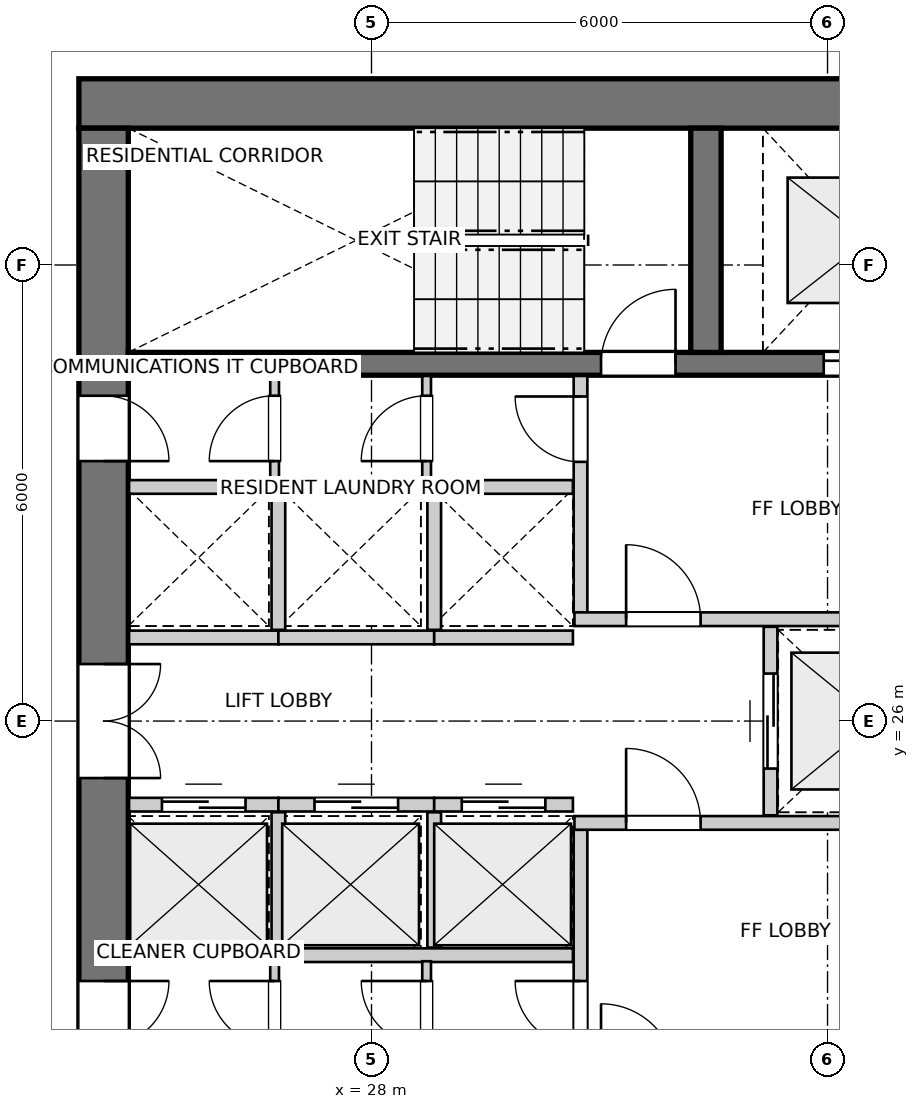
"""IFC4 building model, lengths in metres.
Left out: names, types, materials, properties, quantities, classifications, styles, units other than length and angle.
Written with IfcOpenShell. Run it as: python <this file> out.ifc"""

import sys

from ifc_helpers import new_model, si_unit, direction, frame, frame_2d, origin, place, context, subcontext, project, spatial, rectangle, extrude, source, transform, mapped, element, fill, save


model = new_model("IFC4")
c1 = context("Model", 3, precision=1e-05, world=origin(), true_north=direction((0.0, 1.0)))
c2 = subcontext(c1, "Body", "Model", "MODEL_VIEW")
j1 = project(units=[si_unit("LENGTHUNIT", "METRE"), si_unit("PLANEANGLEUNIT", "RADIAN")], contexts=[c1])
p1 = place(None, origin())
s1 = spatial("IfcSite", under=j1, at=p1, CompositionType="ELEMENT")
p2 = place(p1, origin())
s2 = spatial("IfcBuilding", under=s1, at=p2, CompositionType="ELEMENT")
p3 = place(p2, frame((0.0, 0.0, 118.4)))
s3 = spatial("IfcBuildingStorey", under=s2, at=p3, CompositionType="ELEMENT", Elevation=118.4)
p4 = place(p3, frame((36.55, 34.125, 0.0), z_axis=(0.0, 0.0, 1.0), x_axis=(-1.0, 0.0, 0.0)))
e1 = element("IfcWall", 1, at=p4, inside=s3, PredefinedType="SHEAR", context=c2, shape_type="SweptSolid", body=[
    extrude(rectangle(XDim=12.4, YDim=0.65, at=frame_2d((6.2, 0.0))), origin(), (0.0, 0.0, 1.0), 2.95),
])
p5 = place(p3, frame((24.475, 33.8, 0.0), z_axis=(0.0, 0.0, 1.0), x_axis=(0.0, -1.0, 0.0)))
e2 = element("IfcWall", 2, at=p5, inside=s3, PredefinedType="SHEAR", context=c2, shape_type="SweptSolid", body=[
    extrude(rectangle(XDim=15.6, YDim=0.65, at=frame_2d((7.8, 0.0))), origin(), (0.0, 0.0, 1.0), 2.95),
])
p6 = place(p5, frame((7.05, 0.0, 0.0)))
e3 = element("IfcOpeningElement", 3, at=p6, cuts=e2, PredefinedType="OPENING", context=c2, shape_type="SweptSolid", body=[
    extrude(rectangle(XDim=1.5, YDim=2.15, at=frame_2d((0.75, 1.075))), frame((0.0, 0.335, 0.0), z_axis=(0.0, -1.0, 0.0), x_axis=(1.0, 0.0, 0.0)), (0.0, 0.0, 1.0), 0.67),
])
p7 = place(p5, frame((3.52, 0.0, 0.0)))
e4 = element("IfcOpeningElement", 4, at=p7, cuts=e2, PredefinedType="OPENING", context=c2, shape_type="SweptSolid", body=[
    extrude(rectangle(XDim=0.86, YDim=2.05, at=frame_2d((0.43, 1.025))), frame((0.0, 0.335, 0.0), z_axis=(0.0, -1.0, 0.0), x_axis=(1.0, 0.0, 0.0)), (0.0, 0.0, 1.0), 0.67),
])
p8 = place(p5, frame((11.22, 0.0, 0.0)))
e5 = element("IfcOpeningElement", 5, at=p8, cuts=e2, PredefinedType="OPENING", context=c2, shape_type="SweptSolid", body=[
    extrude(rectangle(XDim=0.86, YDim=2.05, at=frame_2d((0.43, 1.025))), frame((0.0, 0.335, 0.0), z_axis=(0.0, -1.0, 0.0), x_axis=(1.0, 0.0, 0.0)), (0.0, 0.0, 1.0), 0.67),
])
p9 = place(p3, frame((24.8, 30.7, 0.0), z_axis=(0.0, 0.0, 1.0), x_axis=(1.0, 0.0, 0.0)))
e6 = element("IfcWall", 6, at=p9, inside=s3, PredefinedType="SHEAR", context=c2, shape_type="SweptSolid", body=[
    extrude(rectangle(XDim=11.1, YDim=0.3, at=frame_2d((5.55, 0.0))), origin(), (0.0, 0.0, 1.0), 2.95),
])
p10 = place(p9, frame((6.22, 0.0, 0.0)))
e7 = element("IfcOpeningElement", 7, at=p10, cuts=e6, PredefinedType="OPENING", context=c2, shape_type="SweptSolid", body=[
    extrude(rectangle(XDim=0.98, YDim=2.15, at=frame_2d((0.49, 1.075))), frame((0.0, 0.16, 0.0), z_axis=(0.0, -1.0, 0.0), x_axis=(1.0, 0.0, 0.0)), (0.0, 0.0, 1.0), 0.32),
])
p11 = place(p9, frame((9.15, 0.0, 0.0)))
e8 = element("IfcOpeningElement", 8, at=p11, cuts=e6, PredefinedType="OPENING", context=c2, shape_type="SweptSolid", body=[
    extrude(rectangle(XDim=1.15, YDim=2.15, at=frame_2d((0.575, 1.075))), frame((0.0, 0.16, 0.0), z_axis=(0.0, -1.0, 0.0), x_axis=(1.0, 0.0, 0.0)), (0.0, 0.0, 1.0), 0.32),
])
p12 = place(p3, frame((32.4, 30.85, 0.0), z_axis=(0.0, 0.0, 1.0), x_axis=(0.0, 1.0, 0.0)))
e9 = element("IfcWall", 9, at=p12, inside=s3, PredefinedType="SHEAR", context=c2, shape_type="SweptSolid", body=[
    extrude(rectangle(XDim=2.95, YDim=0.4, at=frame_2d((1.475, 0.0))), origin(), (0.0, 0.0, 1.0), 2.95),
])
p13 = place(p3, frame((30.75, 21.46, 0.0), z_axis=(0.0, 0.0, 1.0), x_axis=(0.0, 1.0, 0.0)))
e10 = element("IfcWall", 10, at=p13, inside=s3, PredefinedType="PARTITIONING", context=c2, shape_type="SweptSolid", body=[
    extrude(rectangle(XDim=3.11, YDim=0.18, at=frame_2d((1.555, 0.0))), origin(), (0.0, 0.0, 1.0), 2.95),
])
p14 = place(p13, frame((0.26, 0.0, 0.0)))
e11 = element("IfcOpeningElement", 11, at=p14, cuts=e10, PredefinedType="OPENING", context=c2, shape_type="SweptSolid", body=[
    extrude(rectangle(XDim=0.86, YDim=2.05, at=frame_2d((0.43, 1.025))), frame((0.0, 0.1, 0.0), z_axis=(0.0, -1.0, 0.0), x_axis=(1.0, 0.0, 0.0)), (0.0, 0.0, 1.0), 0.2),
])
p15 = place(p3, frame((30.67, 24.66, 0.0), z_axis=(0.0, 0.0, 1.0), x_axis=(1.0, 0.0, 0.0)))
e12 = element("IfcWall", 12, at=p15, inside=s3, PredefinedType="PARTITIONING", context=c2, shape_type="SweptSolid", body=[
    extrude(rectangle(XDim=5.22, YDim=0.18, at=frame_2d((2.61, 0.0))), origin(), (0.0, 0.0, 1.0), 2.95),
])
p16 = place(p15, frame((0.68, 0.0, 0.0)))
e13 = element("IfcOpeningElement", 13, at=p16, cuts=e12, PredefinedType="OPENING", context=c2, shape_type="SweptSolid", body=[
    extrude(rectangle(XDim=0.98, YDim=2.15, at=frame_2d((0.49, 1.075))), frame((0.0, 0.1, 0.0), z_axis=(0.0, -1.0, 0.0), x_axis=(1.0, 0.0, 0.0)), (0.0, 0.0, 1.0), 0.2),
])
p17 = place(p3, frame((30.75, 27.43, 0.0), z_axis=(0.0, 0.0, 1.0), x_axis=(0.0, 1.0, 0.0)))
e14 = element("IfcWall", 14, at=p17, inside=s3, PredefinedType="PARTITIONING", context=c2, shape_type="SweptSolid", body=[
    extrude(rectangle(XDim=3.11, YDim=0.18, at=frame_2d((1.555, 0.0))), origin(), (0.0, 0.0, 1.0), 2.95),
])
p18 = place(p17, frame((1.98, 0.0, 0.0)))
e15 = element("IfcOpeningElement", 15, at=p18, cuts=e14, PredefinedType="OPENING", context=c2, shape_type="SweptSolid", body=[
    extrude(rectangle(XDim=0.86, YDim=2.05, at=frame_2d((0.43, 1.025))), frame((0.0, 0.1, 0.0), z_axis=(0.0, -1.0, 0.0), x_axis=(1.0, 0.0, 0.0)), (0.0, 0.0, 1.0), 0.2),
])
p19 = place(p3, frame((30.67, 27.34, 0.0), z_axis=(0.0, 0.0, 1.0), x_axis=(1.0, 0.0, 0.0)))
e16 = element("IfcWall", 16, at=p19, inside=s3, PredefinedType="PARTITIONING", context=c2, shape_type="SweptSolid", body=[
    extrude(rectangle(XDim=5.22, YDim=0.18, at=frame_2d((2.61, 0.0))), origin(), (0.0, 0.0, 1.0), 2.95),
])
p20 = place(p19, frame((0.68, 0.0, 0.0)))
e17 = element("IfcOpeningElement", 17, at=p20, cuts=e16, PredefinedType="OPENING", context=c2, shape_type="SweptSolid", body=[
    extrude(rectangle(XDim=0.98, YDim=2.15, at=frame_2d((0.49, 1.075))), frame((0.0, 0.1, 0.0), z_axis=(0.0, -1.0, 0.0), x_axis=(1.0, 0.0, 0.0)), (0.0, 0.0, 1.0), 0.2),
])
p21 = place(p3, frame((33.25, 24.76, 0.0), z_axis=(0.0, 0.0, 1.0), x_axis=(0.0, 1.0, 0.0)))
e18 = element("IfcWall", 18, at=p21, inside=s3, PredefinedType="PARTITIONING", context=c2, shape_type="SweptSolid", body=[
    extrude(rectangle(XDim=2.48, YDim=0.18, at=frame_2d((1.24, 0.0))), origin(), (0.0, 0.0, 1.0), 2.95),
])
p22 = place(p21, frame((0.615, 0.0, 0.0)))
e19 = element("IfcOpeningElement", 19, at=p22, cuts=e18, PredefinedType="OPENING", context=c2, shape_type="SweptSolid", body=[
    extrude(rectangle(XDim=1.25, YDim=2.15, at=frame_2d((0.625, 1.075))), frame((0.0, 0.1, 0.0), z_axis=(0.0, -1.0, 0.0), x_axis=(1.0, 0.0, 0.0)), (0.0, 0.0, 1.0), 0.2),
])
p23 = place(p3, frame((24.81, 22.92, 0.0), z_axis=(0.0, 0.0, 1.0), x_axis=(1.0, 0.0, 0.0)))
e20 = element("IfcWall", 20, at=p23, inside=s3, PredefinedType="PARTITIONING", context=c2, shape_type="SweptSolid", body=[
    extrude(rectangle(XDim=5.84, YDim=0.18, at=frame_2d((2.92, 0.0))), origin(), (0.0, 0.0, 1.0), 2.95),
])
p24 = place(p3, frame((24.81, 24.9, 0.0), z_axis=(0.0, 0.0, 1.0), x_axis=(1.0, 0.0, 0.0)))
e21 = element("IfcWall", 21, at=p24, inside=s3, PredefinedType="PARTITIONING", context=c2, shape_type="SweptSolid", body=[
    extrude(rectangle(XDim=1.965, YDim=0.18, at=frame_2d((0.982, 0.0))), origin(), (0.0, 0.0, 1.0), 2.95),
])
p25 = place(p24, frame((0.433, 0.0, 0.0)))
e22 = element("IfcOpeningElement", 22, at=p25, cuts=e21, PredefinedType="OPENING", context=c2, shape_type="SweptSolid", body=[
    extrude(rectangle(XDim=1.1, YDim=2.15, at=frame_2d((0.55, 1.075))), frame((0.0, 0.1, 0.0), z_axis=(0.0, -1.0, 0.0), x_axis=(1.0, 0.0, 0.0)), (0.0, 0.0, 1.0), 0.2),
])
p26 = place(p3, frame((26.775, 24.9, 0.0), z_axis=(0.0, 0.0, 1.0), x_axis=(1.0, 0.0, 0.0)))
e23 = element("IfcWall", 23, at=p26, inside=s3, PredefinedType="PARTITIONING", context=c2, shape_type="SweptSolid", body=[
    extrude(rectangle(XDim=2.05, YDim=0.18, at=frame_2d((1.025, 0.0))), origin(), (0.0, 0.0, 1.0), 2.95),
])
p27 = place(p26, frame((0.475, 0.0, 0.0)))
e24 = element("IfcOpeningElement", 24, at=p27, cuts=e23, PredefinedType="OPENING", context=c2, shape_type="SweptSolid", body=[
    extrude(rectangle(XDim=1.1, YDim=2.15, at=frame_2d((0.55, 1.075))), frame((0.0, 0.1, 0.0), z_axis=(0.0, -1.0, 0.0), x_axis=(1.0, 0.0, 0.0)), (0.0, 0.0, 1.0), 0.2),
])
p28 = place(p3, frame((26.775, 23.02, 0.0), z_axis=(0.0, 0.0, 1.0), x_axis=(0.0, 1.0, 0.0)))
e25 = element("IfcWall", 25, at=p28, inside=s3, PredefinedType="PARTITIONING", context=c2, shape_type="SweptSolid", body=[
    extrude(rectangle(XDim=1.78, YDim=0.18, at=frame_2d((0.89, 0.0))), origin(), (0.0, 0.0, 1.0), 2.95),
])
p29 = place(p3, frame((28.825, 24.9, 0.0), z_axis=(0.0, 0.0, 1.0), x_axis=(1.0, 0.0, 0.0)))
e26 = element("IfcWall", 26, at=p29, inside=s3, PredefinedType="PARTITIONING", context=c2, shape_type="SweptSolid", body=[
    extrude(rectangle(XDim=1.825, YDim=0.18, at=frame_2d((0.913, 0.0))), origin(), (0.0, 0.0, 1.0), 2.95),
])
p30 = place(p29, frame((0.363, 0.0, 0.0)))
e27 = element("IfcOpeningElement", 27, at=p30, cuts=e26, PredefinedType="OPENING", context=c2, shape_type="SweptSolid", body=[
    extrude(rectangle(XDim=1.1, YDim=2.15, at=frame_2d((0.55, 1.075))), frame((0.0, 0.1, 0.0), z_axis=(0.0, -1.0, 0.0), x_axis=(1.0, 0.0, 0.0)), (0.0, 0.0, 1.0), 0.2),
])
p31 = place(p3, frame((28.825, 23.02, 0.0), z_axis=(0.0, 0.0, 1.0), x_axis=(0.0, 1.0, 0.0)))
e28 = element("IfcWall", 28, at=p31, inside=s3, PredefinedType="PARTITIONING", context=c2, shape_type="SweptSolid", body=[
    extrude(rectangle(XDim=1.78, YDim=0.18, at=frame_2d((0.89, 0.0))), origin(), (0.0, 0.0, 1.0), 2.95),
])
p32 = place(p3, frame((24.81, 29.08, 0.0), z_axis=(0.0, 0.0, 1.0), x_axis=(1.0, 0.0, 0.0)))
e29 = element("IfcWall", 29, at=p32, inside=s3, PredefinedType="PARTITIONING", context=c2, shape_type="SweptSolid", body=[
    extrude(rectangle(XDim=5.84, YDim=0.18, at=frame_2d((2.92, 0.0))), origin(), (0.0, 0.0, 1.0), 2.95),
])
p33 = place(p3, frame((24.81, 27.1, 0.0), z_axis=(0.0, 0.0, 1.0), x_axis=(1.0, 0.0, 0.0)))
e30 = element("IfcWall", 30, at=p33, inside=s3, PredefinedType="PARTITIONING", context=c2, shape_type="SweptSolid", body=[
    extrude(rectangle(XDim=1.965, YDim=0.18, at=frame_2d((0.982, 0.0))), origin(), (0.0, 0.0, 1.0), 2.95),
])
p34 = place(p3, frame((26.775, 27.1, 0.0), z_axis=(0.0, 0.0, 1.0), x_axis=(1.0, 0.0, 0.0)))
e31 = element("IfcWall", 31, at=p34, inside=s3, PredefinedType="PARTITIONING", context=c2, shape_type="SweptSolid", body=[
    extrude(rectangle(XDim=2.05, YDim=0.18, at=frame_2d((1.025, 0.0))), origin(), (0.0, 0.0, 1.0), 2.95),
])
p35 = place(p3, frame((26.775, 27.2, 0.0), z_axis=(0.0, 0.0, 1.0), x_axis=(0.0, 1.0, 0.0)))
e32 = element("IfcWall", 32, at=p35, inside=s3, PredefinedType="PARTITIONING", context=c2, shape_type="SweptSolid", body=[
    extrude(rectangle(XDim=1.78, YDim=0.18, at=frame_2d((0.89, 0.0))), origin(), (0.0, 0.0, 1.0), 2.95),
])
p36 = place(p3, frame((28.825, 27.1, 0.0), z_axis=(0.0, 0.0, 1.0), x_axis=(1.0, 0.0, 0.0)))
e33 = element("IfcWall", 33, at=p36, inside=s3, PredefinedType="PARTITIONING", context=c2, shape_type="SweptSolid", body=[
    extrude(rectangle(XDim=1.825, YDim=0.18, at=frame_2d((0.913, 0.0))), origin(), (0.0, 0.0, 1.0), 2.95),
])
p37 = place(p3, frame((28.825, 27.2, 0.0), z_axis=(0.0, 0.0, 1.0), x_axis=(0.0, 1.0, 0.0)))
e34 = element("IfcWall", 34, at=p37, inside=s3, PredefinedType="PARTITIONING", context=c2, shape_type="SweptSolid", body=[
    extrude(rectangle(XDim=1.78, YDim=0.18, at=frame_2d((0.89, 0.0))), origin(), (0.0, 0.0, 1.0), 2.95),
])
p38 = place(p3, frame((26.725, 21.46, 0.0), z_axis=(0.0, 0.0, 1.0), x_axis=(0.0, 1.0, 0.0)))
e35 = element("IfcWall", 35, at=p38, inside=s3, PredefinedType="PARTITIONING", context=c2, shape_type="SweptSolid", body=[
    extrude(rectangle(XDim=1.38, YDim=0.115, at=frame_2d((0.69, 0.0))), origin(), (0.0, 0.0, 1.0), 2.95),
])
p39 = place(p38, frame((0.26, 0.0, 0.0)))
e36 = element("IfcOpeningElement", 36, at=p39, cuts=e35, PredefinedType="OPENING", context=c2, shape_type="SweptSolid", body=[
    extrude(rectangle(XDim=0.86, YDim=2.05, at=frame_2d((0.43, 1.025))), frame((0.0, 0.067, 0.0), z_axis=(0.0, -1.0, 0.0), x_axis=(1.0, 0.0, 0.0)), (0.0, 0.0, 1.0), 0.135),
])
p40 = place(p3, frame((26.725, 29.16, 0.0), z_axis=(0.0, 0.0, 1.0), x_axis=(0.0, 1.0, 0.0)))
e37 = element("IfcWall", 37, at=p40, inside=s3, PredefinedType="PARTITIONING", context=c2, shape_type="SweptSolid", body=[
    extrude(rectangle(XDim=1.38, YDim=0.115, at=frame_2d((0.69, 0.0))), origin(), (0.0, 0.0, 1.0), 2.95),
])
p41 = place(p40, frame((0.26, 0.0, 0.0)))
e38 = element("IfcOpeningElement", 38, at=p41, cuts=e37, PredefinedType="OPENING", context=c2, shape_type="SweptSolid", body=[
    extrude(rectangle(XDim=0.86, YDim=2.05, at=frame_2d((0.43, 1.025))), frame((0.0, 0.067, 0.0), z_axis=(0.0, -1.0, 0.0), x_axis=(1.0, 0.0, 0.0)), (0.0, 0.0, 1.0), 0.135),
])
p42 = place(p3, frame((28.725, 21.46, 0.0), z_axis=(0.0, 0.0, 1.0), x_axis=(0.0, 1.0, 0.0)))
e39 = element("IfcWall", 39, at=p42, inside=s3, PredefinedType="PARTITIONING", context=c2, shape_type="SweptSolid", body=[
    extrude(rectangle(XDim=1.38, YDim=0.115, at=frame_2d((0.69, 0.0))), origin(), (0.0, 0.0, 1.0), 2.95),
])
p43 = place(p42, frame((0.26, 0.0, 0.0)))
e40 = element("IfcOpeningElement", 40, at=p43, cuts=e39, PredefinedType="OPENING", context=c2, shape_type="SweptSolid", body=[
    extrude(rectangle(XDim=0.86, YDim=2.05, at=frame_2d((0.43, 1.025))), frame((0.0, 0.067, 0.0), z_axis=(0.0, -1.0, 0.0), x_axis=(1.0, 0.0, 0.0)), (0.0, 0.0, 1.0), 0.135),
])
p44 = place(p3, frame((28.725, 29.16, 0.0), z_axis=(0.0, 0.0, 1.0), x_axis=(0.0, 1.0, 0.0)))
e41 = element("IfcWall", 41, at=p44, inside=s3, PredefinedType="PARTITIONING", context=c2, shape_type="SweptSolid", body=[
    extrude(rectangle(XDim=1.38, YDim=0.115, at=frame_2d((0.69, 0.0))), origin(), (0.0, 0.0, 1.0), 2.95),
])
p45 = place(p44, frame((0.26, 0.0, 0.0)))
e42 = element("IfcOpeningElement", 42, at=p45, cuts=e41, PredefinedType="OPENING", context=c2, shape_type="SweptSolid", body=[
    extrude(rectangle(XDim=0.86, YDim=2.05, at=frame_2d((0.43, 1.025))), frame((0.0, 0.067, 0.0), z_axis=(0.0, -1.0, 0.0), x_axis=(1.0, 0.0, 0.0)), (0.0, 0.0, 1.0), 0.135),
])
m1 = source(origin(), c2, "Body", "SweptSolid", [
    extrude(rectangle(XDim=0.98, YDim=2.15, at=frame_2d((0.49, 1.075))), frame((0.0, 0.025, 0.0), z_axis=(0.0, -1.0, 0.0), x_axis=(1.0, 0.0, 0.0)), (0.0, 0.0, 1.0), 0.05),
])
p46 = place(p10, origin())
e43 = element("IfcDoor", 43, at=p46, inside=s3, OperationType="SINGLE_SWING_RIGHT", PredefinedType="DOOR", context=c2, shape_type="MappedRepresentation", body=[
    mapped(m1, transform((0.0, 0.0, 0.0), x_axis=(1.0, 0.0, 0.0), y_axis=(0.0, 1.0, 0.0), z_axis=(0.0, 0.0, 1.0), scale=1.0)),
])
fill(e7, e43)
m2 = source(origin(), c2, "Body", "SweptSolid", [
    extrude(rectangle(XDim=1.15, YDim=2.15, at=frame_2d((0.575, 1.075))), frame((0.0, 0.025, 0.0), z_axis=(0.0, -1.0, 0.0), x_axis=(1.0, 0.0, 0.0)), (0.0, 0.0, 1.0), 0.05),
])
p47 = place(p11, origin())
e44 = element("IfcDoor", 44, at=p47, inside=s3, OperationType="DOUBLE_DOOR_SLIDING", PredefinedType="DOOR", context=c2, shape_type="MappedRepresentation", body=[
    mapped(m2, transform((0.0, 0.0, 0.0), x_axis=(1.0, 0.0, 0.0), y_axis=(0.0, 1.0, 0.0), z_axis=(0.0, 0.0, 1.0), scale=1.0)),
])
fill(e8, e44)
m3 = source(origin(), c2, "Body", "SweptSolid", [
    extrude(rectangle(XDim=1.5, YDim=2.15, at=frame_2d((0.75, 1.075))), frame((0.0, 0.025, 0.0), z_axis=(0.0, -1.0, 0.0), x_axis=(1.0, 0.0, 0.0)), (0.0, 0.0, 1.0), 0.05),
])
p48 = place(p6, origin())
e45 = element("IfcDoor", 45, at=p48, inside=s3, OperationType="DOUBLE_DOOR_SINGLE_SWING", PredefinedType="DOOR", context=c2, shape_type="MappedRepresentation", body=[
    mapped(m3, transform((0.0, 0.0, 0.0), x_axis=(1.0, 0.0, 0.0), y_axis=(0.0, 1.0, 0.0), z_axis=(0.0, 0.0, 1.0), scale=1.0)),
])
fill(e3, e45)
m4 = source(origin(), c2, "Body", "SweptSolid", [
    extrude(rectangle(XDim=0.86, YDim=2.05, at=frame_2d((0.43, 1.025))), frame((0.0, 0.025, 0.0), z_axis=(0.0, -1.0, 0.0), x_axis=(1.0, 0.0, 0.0)), (0.0, 0.0, 1.0), 0.05),
])
p49 = place(p7, origin())
e46 = element("IfcDoor", 46, at=p49, inside=s3, OperationType="SINGLE_SWING_RIGHT", PredefinedType="DOOR", context=c2, shape_type="MappedRepresentation", body=[
    mapped(m4, transform((0.0, 0.0, 0.0), x_axis=(1.0, 0.0, 0.0), y_axis=(0.0, 1.0, 0.0), z_axis=(0.0, 0.0, 1.0), scale=1.0)),
])
fill(e4, e46)
p50 = place(p8, origin())
e47 = element("IfcDoor", 47, at=p50, inside=s3, OperationType="SINGLE_SWING_LEFT", PredefinedType="DOOR", context=c2, shape_type="MappedRepresentation", body=[
    mapped(m4, transform((0.0, 0.0, 0.0), x_axis=(1.0, 0.0, 0.0), y_axis=(0.0, 1.0, 0.0), z_axis=(0.0, 0.0, 1.0), scale=1.0)),
])
fill(e5, e47)
p51 = place(p14, origin())
e48 = element("IfcDoor", 48, at=p51, inside=s3, OperationType="SINGLE_SWING_RIGHT", PredefinedType="DOOR", context=c2, shape_type="MappedRepresentation", body=[
    mapped(m4, transform((0.0, 0.0, 0.0), x_axis=(1.0, 0.0, 0.0), y_axis=(0.0, 1.0, 0.0), z_axis=(0.0, 0.0, 1.0), scale=1.0)),
])
fill(e11, e48)
p52 = place(p16, origin())
e49 = element("IfcDoor", 49, at=p52, inside=s3, OperationType="SINGLE_SWING_LEFT", PredefinedType="DOOR", context=c2, shape_type="MappedRepresentation", body=[
    mapped(m1, transform((0.0, 0.0, 0.0), x_axis=(1.0, 0.0, 0.0), y_axis=(0.0, 1.0, 0.0), z_axis=(0.0, 0.0, 1.0), scale=1.0)),
])
fill(e13, e49)
p53 = place(p18, origin())
e50 = element("IfcDoor", 50, at=p53, inside=s3, OperationType="SINGLE_SWING_RIGHT", PredefinedType="DOOR", context=c2, shape_type="MappedRepresentation", body=[
    mapped(m4, transform((0.0, 0.0, 0.0), x_axis=(1.0, 0.0, 0.0), y_axis=(0.0, 1.0, 0.0), z_axis=(0.0, 0.0, 1.0), scale=1.0)),
])
fill(e15, e50)
p54 = place(p20, origin())
e51 = element("IfcDoor", 51, at=p54, inside=s3, OperationType="SINGLE_SWING_LEFT", PredefinedType="DOOR", context=c2, shape_type="MappedRepresentation", body=[
    mapped(m1, transform((0.0, 0.0, 0.0), x_axis=(1.0, 0.0, 0.0), y_axis=(0.0, 1.0, 0.0), z_axis=(0.0, 0.0, 1.0), scale=1.0)),
])
fill(e17, e51)
m5 = source(origin(), c2, "Body", "SweptSolid", [
    extrude(rectangle(XDim=1.25, YDim=2.15, at=frame_2d((0.625, 1.075))), frame((0.0, 0.025, 0.0), z_axis=(0.0, -1.0, 0.0), x_axis=(1.0, 0.0, 0.0)), (0.0, 0.0, 1.0), 0.05),
])
p55 = place(p22, origin())
e52 = element("IfcDoor", 52, at=p55, inside=s3, OperationType="DOUBLE_DOOR_SLIDING", PredefinedType="DOOR", context=c2, shape_type="MappedRepresentation", body=[
    mapped(m5, transform((0.0, 0.0, 0.0), x_axis=(1.0, 0.0, 0.0), y_axis=(0.0, 1.0, 0.0), z_axis=(0.0, 0.0, 1.0), scale=1.0)),
])
fill(e19, e52)
m6 = source(origin(), c2, "Body", "SweptSolid", [
    extrude(rectangle(XDim=1.1, YDim=2.15, at=frame_2d((0.55, 1.075))), frame((0.0, 0.025, 0.0), z_axis=(0.0, -1.0, 0.0), x_axis=(1.0, 0.0, 0.0)), (0.0, 0.0, 1.0), 0.05),
])
p56 = place(p25, origin())
e53 = element("IfcDoor", 53, at=p56, inside=s3, OperationType="DOUBLE_DOOR_SLIDING", PredefinedType="DOOR", context=c2, shape_type="MappedRepresentation", body=[
    mapped(m6, transform((0.0, 0.0, 0.0), x_axis=(1.0, 0.0, 0.0), y_axis=(0.0, 1.0, 0.0), z_axis=(0.0, 0.0, 1.0), scale=1.0)),
])
fill(e22, e53)
p57 = place(p27, origin())
e54 = element("IfcDoor", 54, at=p57, inside=s3, OperationType="DOUBLE_DOOR_SLIDING", PredefinedType="DOOR", context=c2, shape_type="MappedRepresentation", body=[
    mapped(m6, transform((0.0, 0.0, 0.0), x_axis=(1.0, 0.0, 0.0), y_axis=(0.0, 1.0, 0.0), z_axis=(0.0, 0.0, 1.0), scale=1.0)),
])
fill(e24, e54)
p58 = place(p30, origin())
e55 = element("IfcDoor", 55, at=p58, inside=s3, OperationType="DOUBLE_DOOR_SLIDING", PredefinedType="DOOR", context=c2, shape_type="MappedRepresentation", body=[
    mapped(m6, transform((0.0, 0.0, 0.0), x_axis=(1.0, 0.0, 0.0), y_axis=(0.0, 1.0, 0.0), z_axis=(0.0, 0.0, 1.0), scale=1.0)),
])
fill(e27, e55)
p59 = place(p39, origin())
e56 = element("IfcDoor", 56, at=p59, inside=s3, OperationType="SINGLE_SWING_RIGHT", PredefinedType="DOOR", context=c2, shape_type="MappedRepresentation", body=[
    mapped(m4, transform((0.0, 0.0, 0.0), x_axis=(1.0, 0.0, 0.0), y_axis=(0.0, 1.0, 0.0), z_axis=(0.0, 0.0, 1.0), scale=1.0)),
])
fill(e36, e56)
p60 = place(p41, origin())
e57 = element("IfcDoor", 57, at=p60, inside=s3, OperationType="SINGLE_SWING_LEFT", PredefinedType="DOOR", context=c2, shape_type="MappedRepresentation", body=[
    mapped(m4, transform((0.0, 0.0, 0.0), x_axis=(1.0, 0.0, 0.0), y_axis=(0.0, 1.0, 0.0), z_axis=(0.0, 0.0, 1.0), scale=1.0)),
])
fill(e38, e57)
p61 = place(p43, origin())
e58 = element("IfcDoor", 58, at=p61, inside=s3, OperationType="SINGLE_SWING_RIGHT", PredefinedType="DOOR", context=c2, shape_type="MappedRepresentation", body=[
    mapped(m4, transform((0.0, 0.0, 0.0), x_axis=(1.0, 0.0, 0.0), y_axis=(0.0, 1.0, 0.0), z_axis=(0.0, 0.0, 1.0), scale=1.0)),
])
fill(e40, e58)
p62 = place(p45, origin())
e59 = element("IfcDoor", 59, at=p62, inside=s3, OperationType="SINGLE_SWING_LEFT", PredefinedType="DOOR", context=c2, shape_type="MappedRepresentation", body=[
    mapped(m4, transform((0.0, 0.0, 0.0), x_axis=(1.0, 0.0, 0.0), y_axis=(0.0, 1.0, 0.0), z_axis=(0.0, 0.0, 1.0), scale=1.0)),
])
fill(e42, e59)
save(model, sys.argv[1])
